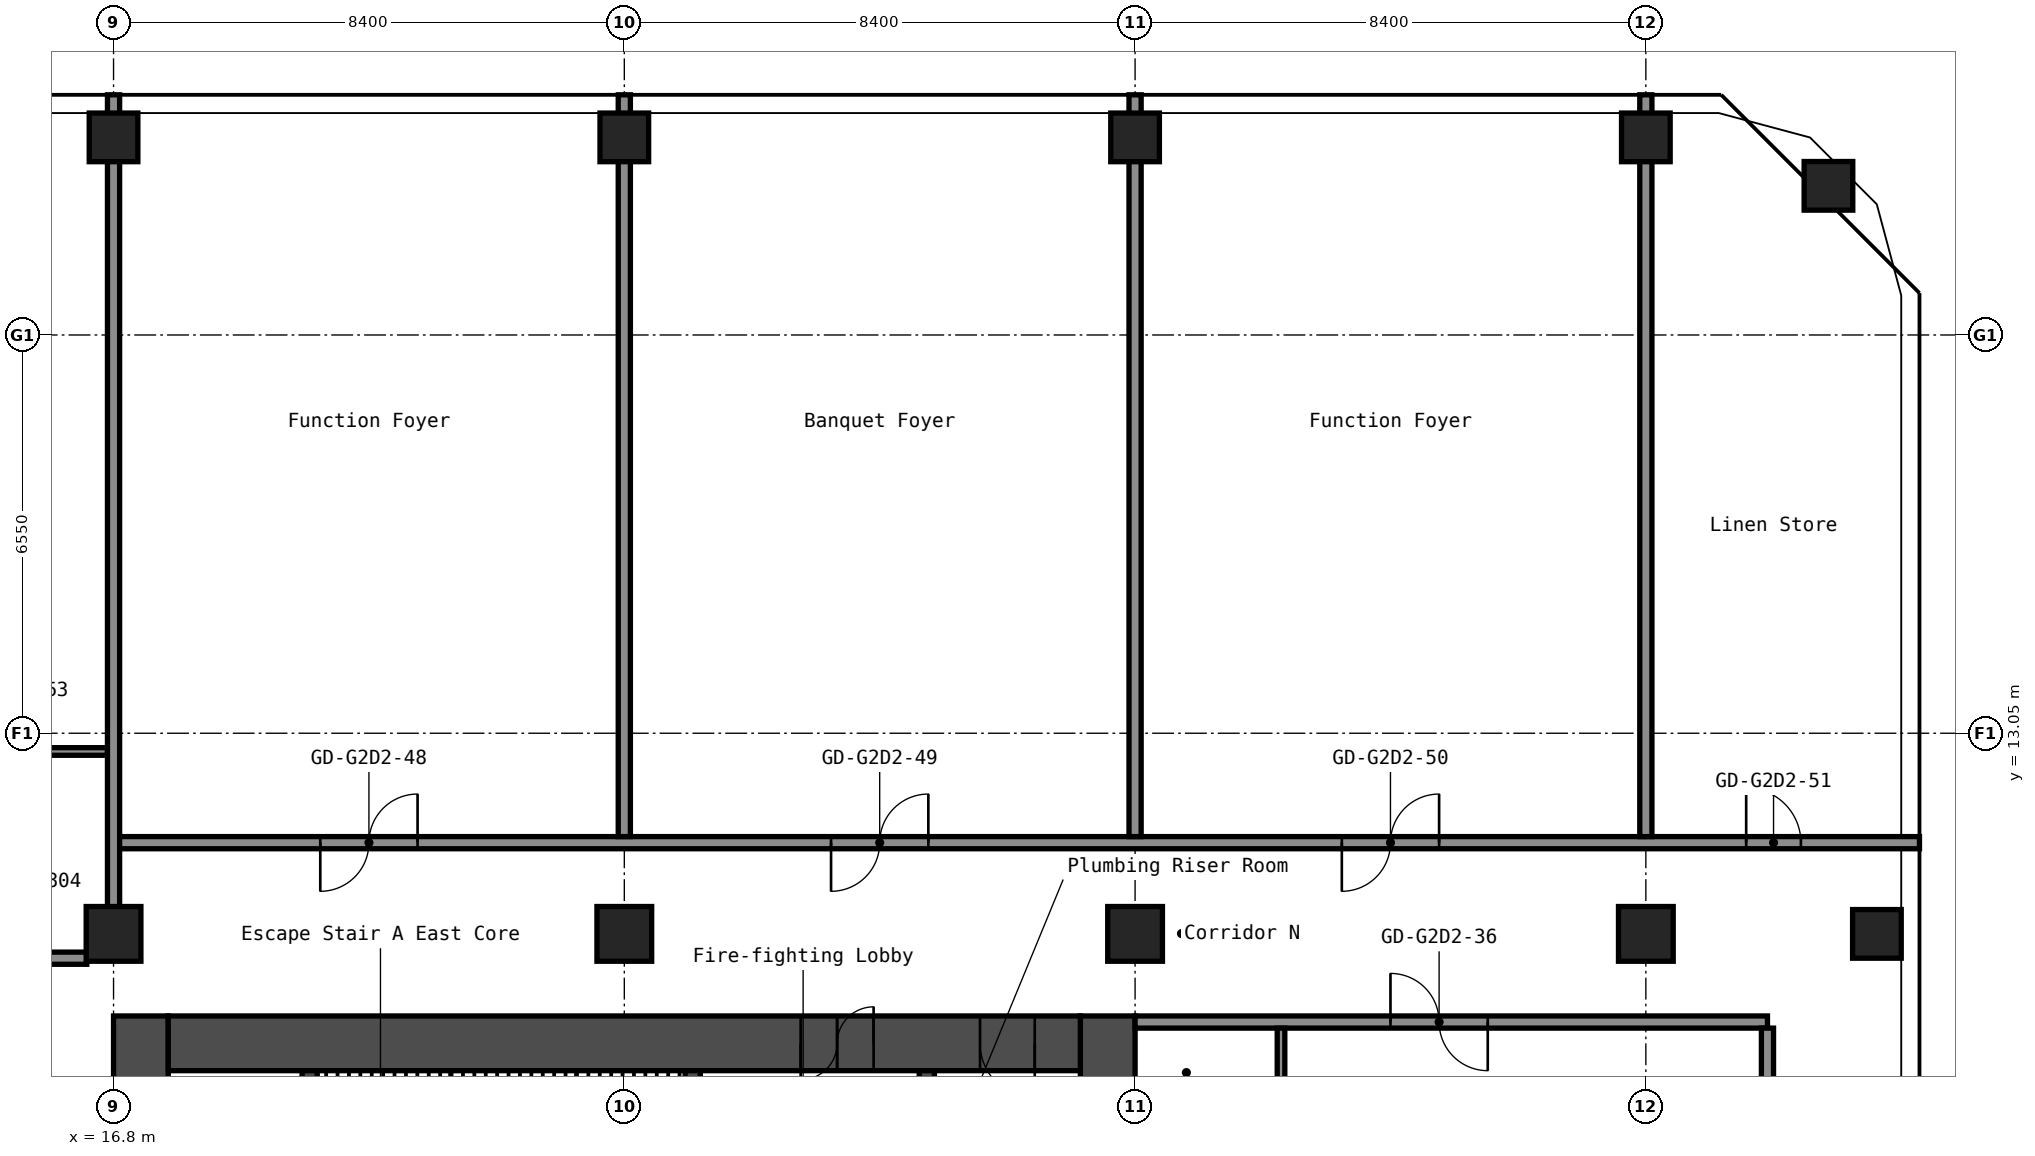
"""IFC4 building model, lengths in metres.
Left out: names, types, materials, properties, quantities, classifications, styles, units other than length and angle.
Written with IfcOpenShell. Run it as: python <this file> out.ifc"""

import sys

from ifc_helpers import new_model, si_unit, direction, frame, frame_2d, origin, origin_2d, place, context, subcontext, project, spatial, rectangle, hollow_rectangle, extrude, element, fill, save


model = new_model("IFC4")
c1 = context("Model", 3, precision=1e-05, world=origin(), true_north=direction((0.0, 1.0)))
c2 = subcontext(c1, "Body", "Model", "MODEL_VIEW")
j1 = project(units=[si_unit("LENGTHUNIT", "METRE"), si_unit("PLANEANGLEUNIT", "RADIAN")], contexts=[c1])
p1 = place(None, origin())
s1 = spatial("IfcSite", under=j1, at=p1, CompositionType="ELEMENT")
p2 = place(p1, origin())
s2 = spatial("IfcBuilding", under=s1, at=p2, CompositionType="ELEMENT")
p3 = place(p2, frame((0.0, 0.0, 117.0)))
s3 = spatial("IfcBuildingStorey", under=s2, at=p3, CompositionType="ELEMENT", Elevation=117.0)
p4 = place(p3, frame((16.8, 9.75, 0.0), z_axis=(0.0, 0.0, 1.0), x_axis=(1.0, 0.0, 0.0)))
e1 = element("IfcColumn", 1, at=p4, inside=s3, PredefinedType="COLUMN", context=c2, shape_type="SweptSolid", body=[
    extrude(hollow_rectangle(XDim=0.9, YDim=0.9, WallThickness=0.036, at=origin_2d()), origin(), (0.0, 0.0, 1.0), 2.9),
])
p5 = place(p3, frame((16.8, 22.85, 0.0), z_axis=(0.0, 0.0, 1.0), x_axis=(1.0, 0.0, 0.0)))
e2 = element("IfcColumn", 2, at=p5, inside=s3, PredefinedType="COLUMN", context=c2, shape_type="SweptSolid", body=[
    extrude(hollow_rectangle(XDim=0.8, YDim=0.8, WallThickness=0.032, at=origin_2d()), origin(), (0.0, 0.0, 1.0), 2.9),
])
p6 = place(p3, frame((25.2, 9.75, 0.0), z_axis=(0.0, 0.0, 1.0), x_axis=(1.0, 0.0, 0.0)))
e3 = element("IfcColumn", 3, at=p6, inside=s3, PredefinedType="COLUMN", context=c2, shape_type="SweptSolid", body=[
    extrude(hollow_rectangle(XDim=0.9, YDim=0.9, WallThickness=0.036, at=origin_2d()), origin(), (0.0, 0.0, 1.0), 2.9),
])
p7 = place(p3, frame((25.2, 22.85, 0.0), z_axis=(0.0, 0.0, 1.0), x_axis=(1.0, 0.0, 0.0)))
e4 = element("IfcColumn", 4, at=p7, inside=s3, PredefinedType="COLUMN", context=c2, shape_type="SweptSolid", body=[
    extrude(hollow_rectangle(XDim=0.8, YDim=0.8, WallThickness=0.032, at=origin_2d()), origin(), (0.0, 0.0, 1.0), 2.9),
])
p8 = place(p3, frame((33.6, 9.75, 0.0), z_axis=(0.0, 0.0, 1.0), x_axis=(1.0, 0.0, 0.0)))
e5 = element("IfcColumn", 5, at=p8, inside=s3, PredefinedType="COLUMN", context=c2, shape_type="SweptSolid", body=[
    extrude(hollow_rectangle(XDim=0.9, YDim=0.9, WallThickness=0.036, at=origin_2d()), origin(), (0.0, 0.0, 1.0), 2.9),
])
p9 = place(p3, frame((33.6, 22.85, 0.0), z_axis=(0.0, 0.0, 1.0), x_axis=(1.0, 0.0, 0.0)))
e6 = element("IfcColumn", 6, at=p9, inside=s3, PredefinedType="COLUMN", context=c2, shape_type="SweptSolid", body=[
    extrude(hollow_rectangle(XDim=0.8, YDim=0.8, WallThickness=0.032, at=origin_2d()), origin(), (0.0, 0.0, 1.0), 2.9),
])
p10 = place(p3, frame((42.0, 9.75, 0.0), z_axis=(0.0, 0.0, 1.0), x_axis=(1.0, 0.0, 0.0)))
e7 = element("IfcColumn", 7, at=p10, inside=s3, PredefinedType="COLUMN", context=c2, shape_type="SweptSolid", body=[
    extrude(hollow_rectangle(XDim=0.9, YDim=0.9, WallThickness=0.036, at=origin_2d()), origin(), (0.0, 0.0, 1.0), 2.9),
])
for number, where, z_axis, x_axis in (
    (8, (42.0, 22.85, 0.0), (0.0, 0.0, 1.0), (1.0, 0.0, 0.0)),
    (9, (45.8, 9.75, 0.0), (0.0, 0.0, 1.0), (1.0, 0.0, 0.0)),
    (10, (45.003, 22.053, 0.0), (0.0, 0.0, 1.0), (1.0, 0.0, 0.0)),
):
    element("IfcColumn", number, at=place(p3, frame(where, z_axis=z_axis, x_axis=x_axis)), inside=s3, PredefinedType="COLUMN", context=c2, shape_type="SweptSolid", body=[
        extrude(hollow_rectangle(XDim=0.8, YDim=0.8, WallThickness=0.032, at=origin_2d()), origin(), (0.0, 0.0, 1.0), 2.9),
    ])
p11 = place(p3, frame((17.25, -8.4, 0.0), z_axis=(0.0, 0.0, 1.0), x_axis=(0.0, 1.0, 0.0)))
e11 = element("IfcWall", 11, at=p11, inside=s3, PredefinedType="SHEAR", context=c2, shape_type="SweptSolid", body=[
    extrude(rectangle(XDim=16.8, YDim=0.9, at=frame_2d((8.4, 0.0))), origin(), (0.0, 0.0, 1.0), 2.9),
])
p12 = place(p11, frame((7.6, 0.0, 0.0)))
e12 = element("IfcOpeningElement", 12, at=p12, cuts=e11, PredefinedType="OPENING", context=c2, shape_type="SweptSolid", body=[
    extrude(rectangle(XDim=1.2, YDim=2.1, at=frame_2d((0.6, 1.05))), frame((0.0, 0.46, 0.0), z_axis=(0.0, -1.0, 0.0), x_axis=(1.0, 0.0, 0.0)), (0.0, 0.0, 1.0), 0.92),
])
p13 = place(p3, frame((33.15, -8.4, 0.0), z_axis=(0.0, 0.0, 1.0), x_axis=(0.0, 1.0, 0.0)))
e13 = element("IfcWall", 13, at=p13, inside=s3, PredefinedType="SHEAR", context=c2, shape_type="SweptSolid", body=[
    extrude(rectangle(XDim=16.8, YDim=0.9, at=frame_2d((8.4, 0.0))), origin(), (0.0, 0.0, 1.0), 2.9),
])
p14 = place(p3, frame((17.7, 7.95, 0.0), z_axis=(0.0, 0.0, 1.0), x_axis=(1.0, 0.0, 0.0)))
e14 = element("IfcWall", 14, at=p14, inside=s3, PredefinedType="SHEAR", context=c2, shape_type="SweptSolid", body=[
    extrude(rectangle(XDim=15.0, YDim=0.9, at=frame_2d((7.5, 0.0))), origin(), (0.0, 0.0, 1.0), 2.9),
])
p15 = place(p14, frame((10.4, 0.0, 0.0)))
e15 = element("IfcOpeningElement", 15, at=p15, cuts=e14, PredefinedType="OPENING", context=c2, shape_type="SweptSolid", body=[
    extrude(rectangle(XDim=1.2, YDim=2.1, at=frame_2d((0.6, 1.05))), frame((0.0, 0.46, 0.0), z_axis=(0.0, -1.0, 0.0), x_axis=(1.0, 0.0, 0.0)), (0.0, 0.0, 1.0), 0.92),
])
p16 = place(p14, frame((13.35, 0.0, 0.0)))
e16 = element("IfcOpeningElement", 16, at=p16, cuts=e14, PredefinedType="OPENING", context=c2, shape_type="SweptSolid", body=[
    extrude(rectangle(XDim=0.9, YDim=2.1, at=frame_2d((0.45, 1.05))), frame((0.0, 0.46, 0.0), z_axis=(0.0, -1.0, 0.0), x_axis=(1.0, 0.0, 0.0)), (0.0, 0.0, 1.0), 0.92),
])
p17 = place(p3, frame((20.025, 1.2, 0.0), z_axis=(0.0, 0.0, 1.0), x_axis=(0.0, 1.0, 0.0)))
e17 = element("IfcWall", 17, at=p17, inside=s3, PredefinedType="SHEAR", context=c2, shape_type="SweptSolid", body=[
    extrude(rectangle(XDim=6.3, YDim=0.25, at=frame_2d((3.15, 0.0))), origin(), (0.0, 0.0, 1.0), 2.9),
])
p18 = place(p3, frame((26.325, 3.75, 0.0), z_axis=(0.0, 0.0, 1.0), x_axis=(0.0, 1.0, 0.0)))
e18 = element("IfcWall", 18, at=p18, inside=s3, PredefinedType="SHEAR", context=c2, shape_type="SweptSolid", body=[
    extrude(rectangle(XDim=3.75, YDim=0.25, at=frame_2d((1.875, 0.0))), origin(), (0.0, 0.0, 1.0), 2.9),
])
p19 = place(p18, frame((1.25, 0.0, 0.0)))
e19 = element("IfcOpeningElement", 19, at=p19, cuts=e18, PredefinedType="OPENING", context=c2, shape_type="SweptSolid", body=[
    extrude(rectangle(XDim=1.2, YDim=2.1, at=frame_2d((0.6, 1.05))), frame((0.0, 0.135, 0.0), z_axis=(0.0, -1.0, 0.0), x_axis=(1.0, 0.0, 0.0)), (0.0, 0.0, 1.0), 0.27),
])
p20 = place(p3, frame((30.175, 1.45, 0.0), z_axis=(0.0, 0.0, 1.0), x_axis=(0.0, 1.0, 0.0)))
e20 = element("IfcWall", 20, at=p20, inside=s3, PredefinedType="SHEAR", context=c2, shape_type="SweptSolid", body=[
    extrude(rectangle(XDim=6.05, YDim=0.25, at=frame_2d((3.025, 0.0))), origin(), (0.0, 0.0, 1.0), 2.9),
])
p21 = place(p20, frame((2.625, 0.0, 0.0)))
e21 = element("IfcOpeningElement", 21, at=p21, cuts=e20, PredefinedType="OPENING", context=c2, shape_type="SweptSolid", body=[
    extrude(rectangle(XDim=1.1, YDim=2.1, at=frame_2d((0.55, 1.05))), frame((0.0, 0.135, 0.0), z_axis=(0.0, -1.0, 0.0), x_axis=(1.0, 0.0, 0.0)), (0.0, 0.0, 1.0), 0.27),
])
p22 = place(p3, frame((33.6, 8.3, 0.0), z_axis=(0.0, 0.0, 1.0), x_axis=(1.0, 0.0, 0.0)))
e22 = element("IfcWall", 22, at=p22, inside=s3, PredefinedType="PARTITIONING", context=c2, shape_type="SweptSolid", body=[
    extrude(rectangle(XDim=10.4, YDim=0.2, at=frame_2d((5.2, 0.0))), origin(), (0.0, 0.0, 1.0), 2.9),
])
p23 = place(p22, frame((4.2, 0.0, 0.0)))
e23 = element("IfcOpeningElement", 23, at=p23, cuts=e22, PredefinedType="OPENING", context=c2, shape_type="SweptSolid", body=[
    extrude(rectangle(XDim=1.6, YDim=2.1, at=frame_2d((0.8, 1.05))), frame((0.0, 0.11, 0.0), z_axis=(0.0, -1.0, 0.0), x_axis=(1.0, 0.0, 0.0)), (0.0, 0.0, 1.0), 0.22),
])
p24 = place(p3, frame((-16.36, 9.35, 0.0), z_axis=(0.0, 0.0, 1.0), x_axis=(1.0, 0.0, 0.0)))
e24 = element("IfcWall", 24, at=p24, inside=s3, PredefinedType="PARTITIONING", context=c2, shape_type="SweptSolid", body=[
    extrude(rectangle(XDim=32.72, YDim=0.2, at=frame_2d((16.36, 0.0))), origin(), (0.0, 0.0, 1.0), 2.9),
])
p25 = place(p24, frame((2.41, 0.0, 0.0)))
e25 = element("IfcOpeningElement", 25, at=p25, cuts=e24, PredefinedType="OPENING", context=c2, shape_type="SweptSolid", body=[
    extrude(rectangle(XDim=1.0, YDim=2.1, at=frame_2d((0.5, 1.05))), frame((0.0, 0.11, 0.0), z_axis=(0.0, -1.0, 0.0), x_axis=(1.0, 0.0, 0.0)), (0.0, 0.0, 1.0), 0.22),
])
p26 = place(p24, frame((4.11, 0.0, 0.0)))
e26 = element("IfcOpeningElement", 26, at=p26, cuts=e24, PredefinedType="OPENING", context=c2, shape_type="SweptSolid", body=[
    extrude(rectangle(XDim=1.0, YDim=2.1, at=frame_2d((0.5, 1.05))), frame((0.0, 0.11, 0.0), z_axis=(0.0, -1.0, 0.0), x_axis=(1.0, 0.0, 0.0)), (0.0, 0.0, 1.0), 0.22),
])
p27 = place(p24, frame((9.96, 0.0, 0.0)))
e27 = element("IfcOpeningElement", 27, at=p27, cuts=e24, PredefinedType="OPENING", context=c2, shape_type="SweptSolid", body=[
    extrude(rectangle(XDim=1.0, YDim=2.1, at=frame_2d((0.5, 1.05))), frame((0.0, 0.11, 0.0), z_axis=(0.0, -1.0, 0.0), x_axis=(1.0, 0.0, 0.0)), (0.0, 0.0, 1.0), 0.22),
])
p28 = place(p24, frame((19.21, 0.0, 0.0)))
e28 = element("IfcOpeningElement", 28, at=p28, cuts=e24, PredefinedType="OPENING", context=c2, shape_type="SweptSolid", body=[
    extrude(rectangle(XDim=1.0, YDim=2.1, at=frame_2d((0.5, 1.05))), frame((0.0, 0.11, 0.0), z_axis=(0.0, -1.0, 0.0), x_axis=(1.0, 0.0, 0.0)), (0.0, 0.0, 1.0), 0.22),
])
p29 = place(p24, frame((20.91, 0.0, 0.0)))
e29 = element("IfcOpeningElement", 29, at=p29, cuts=e24, PredefinedType="OPENING", context=c2, shape_type="SweptSolid", body=[
    extrude(rectangle(XDim=1.0, YDim=2.1, at=frame_2d((0.5, 1.05))), frame((0.0, 0.11, 0.0), z_axis=(0.0, -1.0, 0.0), x_axis=(1.0, 0.0, 0.0)), (0.0, 0.0, 1.0), 0.22),
])
p30 = place(p24, frame((26.76, 0.0, 0.0)))
e30 = element("IfcOpeningElement", 30, at=p30, cuts=e24, PredefinedType="OPENING", context=c2, shape_type="SweptSolid", body=[
    extrude(rectangle(XDim=1.0, YDim=2.1, at=frame_2d((0.5, 1.05))), frame((0.0, 0.11, 0.0), z_axis=(0.0, -1.0, 0.0), x_axis=(1.0, 0.0, 0.0)), (0.0, 0.0, 1.0), 0.22),
])
p31 = place(p3, frame((16.8, 11.25, 0.0), z_axis=(0.0, 0.0, 1.0), x_axis=(1.0, 0.0, 0.0)))
e31 = element("IfcWall", 31, at=p31, inside=s3, PredefinedType="PARTITIONING", context=c2, shape_type="SweptSolid", body=[
    extrude(rectangle(XDim=29.7, YDim=0.2, at=frame_2d((14.85, 0.0))), origin(), (0.0, 0.0, 1.0), 2.9),
])
p32 = place(p31, frame((3.4, 0.0, 0.0)))
e32 = element("IfcOpeningElement", 32, at=p32, cuts=e31, PredefinedType="OPENING", context=c2, shape_type="SweptSolid", body=[
    extrude(rectangle(XDim=1.6, YDim=2.1, at=frame_2d((0.8, 1.05))), frame((0.0, 0.11, 0.0), z_axis=(0.0, -1.0, 0.0), x_axis=(1.0, 0.0, 0.0)), (0.0, 0.0, 1.0), 0.22),
])
p33 = place(p31, frame((11.8, 0.0, 0.0)))
e33 = element("IfcOpeningElement", 33, at=p33, cuts=e31, PredefinedType="OPENING", context=c2, shape_type="SweptSolid", body=[
    extrude(rectangle(XDim=1.6, YDim=2.1, at=frame_2d((0.8, 1.05))), frame((0.0, 0.11, 0.0), z_axis=(0.0, -1.0, 0.0), x_axis=(1.0, 0.0, 0.0)), (0.0, 0.0, 1.0), 0.22),
])
p34 = place(p31, frame((20.2, 0.0, 0.0)))
e34 = element("IfcOpeningElement", 34, at=p34, cuts=e31, PredefinedType="OPENING", context=c2, shape_type="SweptSolid", body=[
    extrude(rectangle(XDim=1.6, YDim=2.1, at=frame_2d((0.8, 1.05))), frame((0.0, 0.11, 0.0), z_axis=(0.0, -1.0, 0.0), x_axis=(1.0, 0.0, 0.0)), (0.0, 0.0, 1.0), 0.22),
])
p35 = place(p31, frame((26.85, 0.0, 0.0)))
e35 = element("IfcOpeningElement", 35, at=p35, cuts=e31, PredefinedType="OPENING", context=c2, shape_type="SweptSolid", body=[
    extrude(rectangle(XDim=0.9, YDim=2.1, at=frame_2d((0.45, 1.05))), frame((0.0, 0.11, 0.0), z_axis=(0.0, -1.0, 0.0), x_axis=(1.0, 0.0, 0.0)), (0.0, 0.0, 1.0), 0.22),
])
p36 = place(p3, frame((13.462, 12.75, 0.0), z_axis=(0.0, 0.0, 1.0), x_axis=(1.0, 0.0, 0.0)))
e36 = element("IfcWall", 36, at=p36, inside=s3, PredefinedType="PARTITIONING", context=c2, shape_type="SweptSolid", body=[
    extrude(rectangle(XDim=3.238, YDim=0.125, at=frame_2d((1.619, 0.0))), origin(), (0.0, 0.0, 1.0), 2.9),
])
p37 = place(p36, frame((1.238, 0.0, 0.0)))
e37 = element("IfcOpeningElement", 37, at=p37, cuts=e36, PredefinedType="OPENING", context=c2, shape_type="SweptSolid", body=[
    extrude(rectangle(XDim=0.8, YDim=2.1, at=frame_2d((0.4, 1.05))), frame((0.0, 0.073, 0.0), z_axis=(0.0, -1.0, 0.0), x_axis=(1.0, 0.0, 0.0)), (0.0, 0.0, 1.0), 0.145),
])
p38 = place(p3, frame((16.8, 10.19, 0.0), z_axis=(0.0, 0.0, 1.0), x_axis=(0.0, 1.0, 0.0)))
e38 = element("IfcWall", 38, at=p38, inside=s3, PredefinedType="PARTITIONING", context=c2, shape_type="SweptSolid", body=[
    extrude(rectangle(XDim=13.36, YDim=0.2, at=frame_2d((6.68, 0.0))), origin(), (0.0, 0.0, 1.0), 2.9),
])
for number, where, z_axis, x_axis in (
    (39, (25.2, 11.35, 0.0), (0.0, 0.0, 1.0), (0.0, 1.0, 0.0)),
    (40, (33.6, 11.35, 0.0), (0.0, 0.0, 1.0), (0.0, 1.0, 0.0)),
):
    element("IfcWall", number, at=place(p3, frame(where, z_axis=z_axis, x_axis=x_axis)), inside=s3, PredefinedType="PARTITIONING", context=c2, shape_type="SweptSolid", body=[
        extrude(rectangle(XDim=12.2, YDim=0.2, at=frame_2d((6.1, 0.0))), origin(), (0.0, 0.0, 1.0), 2.9),
    ])
p39 = place(p3, frame((36.0, 5.7, 0.0), z_axis=(0.0, 0.0, 1.0), x_axis=(0.0, 1.0, 0.0)))
e41 = element("IfcWall", 41, at=p39, inside=s3, PredefinedType="PARTITIONING", context=c2, shape_type="SweptSolid", body=[
    extrude(rectangle(XDim=2.5, YDim=0.125, at=frame_2d((1.25, 0.0))), origin(), (0.0, 0.0, 1.0), 2.9),
])
p40 = place(p39, frame((0.55, 0.0, 0.0)))
e42 = element("IfcOpeningElement", 42, at=p40, cuts=e41, PredefinedType="OPENING", context=c2, shape_type="SweptSolid", body=[
    extrude(rectangle(XDim=0.9, YDim=2.1, at=frame_2d((0.45, 1.05))), frame((0.0, 0.073, 0.0), z_axis=(0.0, -1.0, 0.0), x_axis=(1.0, 0.0, 0.0)), (0.0, 0.0, 1.0), 0.145),
])
p41 = place(p3, frame((42.0, 11.35, 0.0), z_axis=(0.0, 0.0, 1.0), x_axis=(0.0, 1.0, 0.0)))
e43 = element("IfcWall", 43, at=p41, inside=s3, PredefinedType="PARTITIONING", context=c2, shape_type="SweptSolid", body=[
    extrude(rectangle(XDim=12.2, YDim=0.2, at=frame_2d((6.1, 0.0))), origin(), (0.0, 0.0, 1.0), 2.9),
])
p42 = place(p3, frame((44.0, -8.2, 0.0), z_axis=(0.0, 0.0, 1.0), x_axis=(0.0, 1.0, 0.0)))
e44 = element("IfcWall", 44, at=p42, inside=s3, PredefinedType="PARTITIONING", context=c2, shape_type="SweptSolid", body=[
    extrude(rectangle(XDim=16.4, YDim=0.2, at=frame_2d((8.2, 0.0))), origin(), (0.0, 0.0, 1.0), 2.9),
])
p43 = place(p15, origin())
e45 = element("IfcDoor", 45, at=p43, inside=s3, OperationType="DOUBLE_DOOR_SINGLE_SWING", PredefinedType="DOOR", context=c2, shape_type="SweptSolid", body=[
    extrude(rectangle(XDim=1.2, YDim=2.1, at=frame_2d((0.6, 1.05))), frame((0.0, 0.025, 0.0), z_axis=(0.0, -1.0, 0.0), x_axis=(1.0, 0.0, 0.0)), (0.0, 0.0, 1.0), 0.05),
])
fill(e15, e45)
p44 = place(p16, origin())
e46 = element("IfcDoor", 46, at=p44, inside=s3, OperationType="SINGLE_SWING_RIGHT", PredefinedType="DOOR", context=c2, shape_type="SweptSolid", body=[
    extrude(rectangle(XDim=0.9, YDim=2.1, at=frame_2d((0.45, 1.05))), frame((0.0, 0.025, 0.0), z_axis=(0.0, -1.0, 0.0), x_axis=(1.0, 0.0, 0.0)), (0.0, 0.0, 1.0), 0.05),
])
fill(e16, e46)
p45 = place(p23, origin())
e47 = element("IfcDoor", 47, at=p45, inside=s3, OperationType="DOUBLE_DOOR_SINGLE_SWING", PredefinedType="DOOR", context=c2, shape_type="SweptSolid", body=[
    extrude(rectangle(XDim=1.6, YDim=2.1, at=frame_2d((0.8, 1.05))), frame((0.0, 0.025, 0.0), z_axis=(0.0, -1.0, 0.0), x_axis=(1.0, 0.0, 0.0)), (0.0, 0.0, 1.0), 0.05),
])
fill(e23, e47)
p46 = place(p32, origin())
e48 = element("IfcDoor", 48, at=p46, inside=s3, OperationType="DOUBLE_DOOR_SINGLE_SWING", PredefinedType="DOOR", context=c2, shape_type="SweptSolid", body=[
    extrude(rectangle(XDim=1.6, YDim=2.1, at=frame_2d((0.8, 1.05))), frame((0.0, 0.025, 0.0), z_axis=(0.0, -1.0, 0.0), x_axis=(1.0, 0.0, 0.0)), (0.0, 0.0, 1.0), 0.05),
])
fill(e32, e48)
p47 = place(p33, origin())
e49 = element("IfcDoor", 49, at=p47, inside=s3, OperationType="DOUBLE_DOOR_SINGLE_SWING", PredefinedType="DOOR", context=c2, shape_type="SweptSolid", body=[
    extrude(rectangle(XDim=1.6, YDim=2.1, at=frame_2d((0.8, 1.05))), frame((0.0, 0.025, 0.0), z_axis=(0.0, -1.0, 0.0), x_axis=(1.0, 0.0, 0.0)), (0.0, 0.0, 1.0), 0.05),
])
fill(e33, e49)
p48 = place(p34, origin())
e50 = element("IfcDoor", 50, at=p48, inside=s3, OperationType="DOUBLE_DOOR_SINGLE_SWING", PredefinedType="DOOR", context=c2, shape_type="SweptSolid", body=[
    extrude(rectangle(XDim=1.6, YDim=2.1, at=frame_2d((0.8, 1.05))), frame((0.0, 0.025, 0.0), z_axis=(0.0, -1.0, 0.0), x_axis=(1.0, 0.0, 0.0)), (0.0, 0.0, 1.0), 0.05),
])
fill(e34, e50)
p49 = place(p35, origin())
e51 = element("IfcDoor", 51, at=p49, inside=s3, OperationType="SINGLE_SWING_RIGHT", PredefinedType="DOOR", context=c2, shape_type="SweptSolid", body=[
    extrude(rectangle(XDim=0.9, YDim=2.1, at=frame_2d((0.45, 1.05))), frame((0.0, 0.025, 0.0), z_axis=(0.0, -1.0, 0.0), x_axis=(1.0, 0.0, 0.0)), (0.0, 0.0, 1.0), 0.05),
])
fill(e35, e51)
save(model, sys.argv[1])
